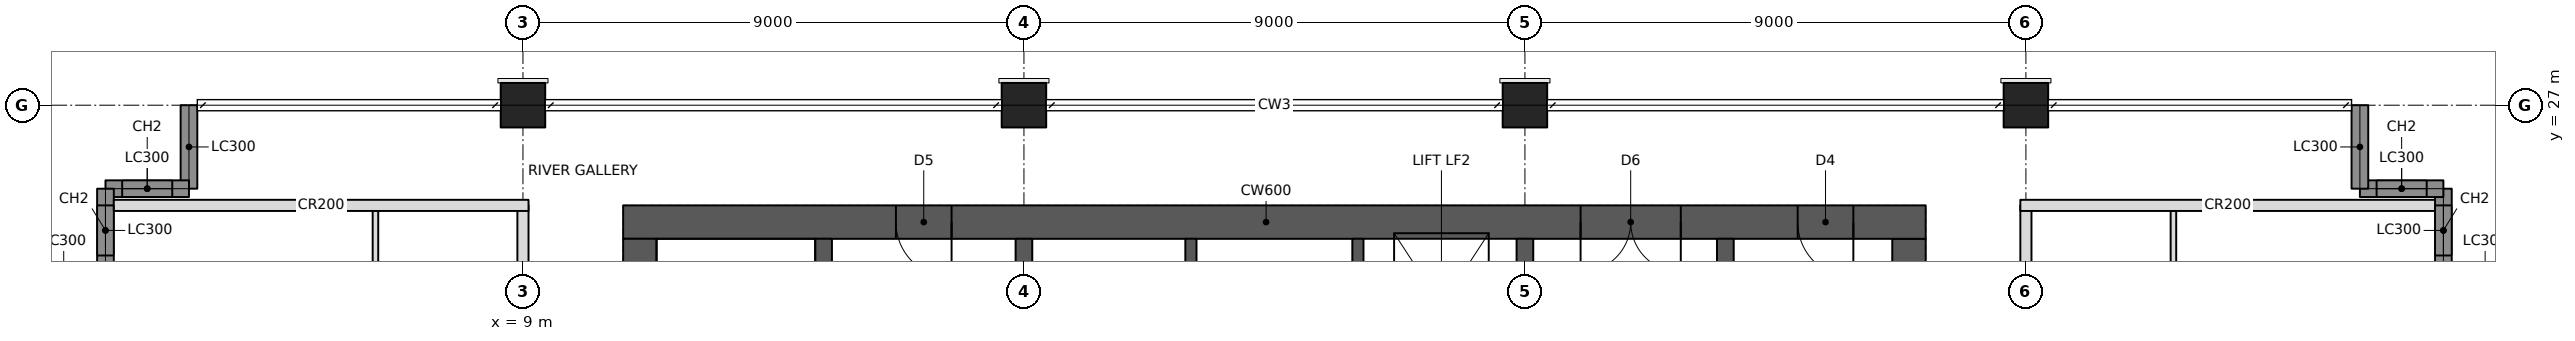
"""IFC4 building model, lengths in metres.
Left out: names, types, materials, properties, quantities, classifications, styles, units other than length and angle.
Written with IfcOpenShell. Run it as: python <this file> out.ifc"""

import sys

from ifc_helpers import new_model, si_unit, direction, frame, frame_2d, origin, origin_2d, place, context, subcontext, project, spatial, rectangle, hollow_rectangle, extrude, element, fill, save


model = new_model("IFC4")
c1 = context("Model", 3, precision=1e-05, world=origin(), true_north=direction((0.0, 1.0)))
c2 = subcontext(c1, "Body", "Model", "MODEL_VIEW")
j1 = project(units=[si_unit("LENGTHUNIT", "METRE"), si_unit("PLANEANGLEUNIT", "RADIAN")], contexts=[c1])
p1 = place(None, origin())
s1 = spatial("IfcSite", under=j1, at=p1, CompositionType="ELEMENT")
p2 = place(p1, origin())
s2 = spatial("IfcBuilding", under=s1, at=p2, CompositionType="ELEMENT")
p3 = place(p2, frame((0.0, 0.0, 177.4)))
s3 = spatial("IfcBuildingStorey", under=s2, at=p3, CompositionType="ELEMENT", Elevation=177.4)
for number, where, z_axis, x_axis in (
    (1, (9.0, 27.0, 0.0), (0.0, 0.0, 1.0), (1.0, 0.0, 0.0)),
    (2, (18.0, 27.0, 0.0), (0.0, 0.0, 1.0), (1.0, 0.0, 0.0)),
    (3, (27.0, 27.0, 0.0), (0.0, 0.0, 1.0), (1.0, 0.0, 0.0)),
    (4, (36.0, 27.0, 0.0), (0.0, 0.0, 1.0), (1.0, 0.0, 0.0)),
):
    element("IfcColumn", number, at=place(p3, frame(where, z_axis=z_axis, x_axis=x_axis)), inside=s3, PredefinedType="COLUMN", context=c2, shape_type="SweptSolid", body=[
        extrude(hollow_rectangle(XDim=0.8, YDim=0.8, WallThickness=0.07, at=origin_2d()), origin(), (0.0, 0.0, 1.0), 3.4),
    ])
p4 = place(p3, frame((10.8, 24.9, 0.0), z_axis=(0.0, 0.0, 1.0), x_axis=(1.0, 0.0, 0.0)))
e5 = element("IfcWall", 5, at=p4, inside=s3, PredefinedType="SHEAR", context=c2, shape_type="SweptSolid", body=[
    extrude(rectangle(XDim=23.4, YDim=0.6, at=frame_2d((11.7, 0.0))), origin(), (0.0, 0.0, 1.0), 3.4),
])
p5 = place(p4, frame((17.2, 0.0, 0.0)))
e6 = element("IfcOpeningElement", 6, at=p5, cuts=e5, PredefinedType="OPENING", context=c2, shape_type="SweptSolid", body=[
    extrude(rectangle(XDim=1.8, YDim=2.1, at=frame_2d((0.9, 1.05))), frame((0.0, 0.31, 0.0), z_axis=(0.0, -1.0, 0.0), x_axis=(1.0, 0.0, 0.0)), (0.0, 0.0, 1.0), 0.62),
])
p6 = place(p4, frame((21.1, 0.0, 0.0)))
e7 = element("IfcOpeningElement", 7, at=p6, cuts=e5, PredefinedType="OPENING", context=c2, shape_type="SweptSolid", body=[
    extrude(rectangle(XDim=1.0, YDim=2.1, at=frame_2d((0.5, 1.05))), frame((0.0, 0.31, 0.0), z_axis=(0.0, -1.0, 0.0), x_axis=(1.0, 0.0, 0.0)), (0.0, 0.0, 1.0), 0.62),
])
p7 = place(p4, frame((4.9, 0.0, 0.0)))
e8 = element("IfcOpeningElement", 8, at=p7, cuts=e5, PredefinedType="OPENING", context=c2, shape_type="SweptSolid", body=[
    extrude(rectangle(XDim=1.0, YDim=2.1, at=frame_2d((0.5, 1.05))), frame((0.0, 0.31, 0.0), z_axis=(0.0, -1.0, 0.0), x_axis=(1.0, 0.0, 0.0)), (0.0, 0.0, 1.0), 0.62),
])
for number, where, z_axis, x_axis in (
    (9, (11.1, 11.4, 0.0), (0.0, 0.0, 1.0), (0.0, 1.0, 0.0)),
    (10, (33.9, 11.4, 0.0), (0.0, 0.0, 1.0), (0.0, 1.0, 0.0)),
):
    element("IfcWall", number, at=place(p3, frame(where, z_axis=z_axis, x_axis=x_axis)), inside=s3, PredefinedType="SHEAR", context=c2, shape_type="SweptSolid", body=[
        extrude(rectangle(XDim=13.2, YDim=0.6, at=frame_2d((6.6, 0.0))), origin(), (0.0, 0.0, 1.0), 3.4),
    ])
p8 = place(p3, frame((14.4, 11.4, 0.0), z_axis=(0.0, 0.0, 1.0), x_axis=(0.0, 1.0, 0.0)))
e11 = element("IfcWall", 11, at=p8, inside=s3, PredefinedType="SHEAR", context=c2, shape_type="SweptSolid", body=[
    extrude(rectangle(XDim=13.2, YDim=0.3, at=frame_2d((6.6, 0.0))), origin(), (0.0, 0.0, 1.0), 3.4),
])
p9 = place(p3, frame((18.0, 11.4, 0.0), z_axis=(0.0, 0.0, 1.0), x_axis=(0.0, 1.0, 0.0)))
e12 = element("IfcWall", 12, at=p9, inside=s3, PredefinedType="SHEAR", context=c2, shape_type="SweptSolid", body=[
    extrude(rectangle(XDim=13.2, YDim=0.3, at=frame_2d((6.6, 0.0))), origin(), (0.0, 0.0, 1.0), 3.4),
])
p10 = place(p9, frame((3.6, 0.0, 0.0)))
e13 = element("IfcOpeningElement", 13, at=p10, cuts=e12, PredefinedType="OPENING", context=c2, shape_type="SweptSolid", body=[
    extrude(rectangle(XDim=1.0, YDim=2.1, at=frame_2d((0.5, 1.05))), frame((0.0, 0.16, 0.0), z_axis=(0.0, -1.0, 0.0), x_axis=(1.0, 0.0, 0.0)), (0.0, 0.0, 1.0), 0.32),
])
p11 = place(p9, frame((7.85, 0.0, 0.0)))
e14 = element("IfcOpeningElement", 14, at=p11, cuts=e12, PredefinedType="OPENING", context=c2, shape_type="SweptSolid", body=[
    extrude(rectangle(XDim=1.1, YDim=2.1, at=frame_2d((0.55, 1.05))), frame((0.0, 0.16, 0.0), z_axis=(0.0, -1.0, 0.0), x_axis=(1.0, 0.0, 0.0)), (0.0, 0.0, 1.0), 0.32),
])
p12 = place(p3, frame((27.0, 21.75, 0.0), z_axis=(0.0, 0.0, 1.0), x_axis=(0.0, 1.0, 0.0)))
e15 = element("IfcWall", 15, at=p12, inside=s3, PredefinedType="SHEAR", context=c2, shape_type="SweptSolid", body=[
    extrude(rectangle(XDim=2.85, YDim=0.3, at=frame_2d((1.425, 0.0))), origin(), (0.0, 0.0, 1.0), 3.4),
])
for number, where, z_axis, x_axis in (
    (16, (21.0, 21.75, 0.0), (0.0, 0.0, 1.0), (0.0, 1.0, 0.0)),
    (17, (24.0, 21.75, 0.0), (0.0, 0.0, 1.0), (0.0, 1.0, 0.0)),
):
    element("IfcWall", number, at=place(p3, frame(where, z_axis=z_axis, x_axis=x_axis)), inside=s3, PredefinedType="SHEAR", context=c2, shape_type="SweptSolid", body=[
        extrude(rectangle(XDim=2.85, YDim=0.2, at=frame_2d((1.425, 0.0))), origin(), (0.0, 0.0, 1.0), 3.4),
    ])
p13 = place(p3, frame((30.6, 11.4, 0.0), z_axis=(0.0, 0.0, 1.0), x_axis=(0.0, 1.0, 0.0)))
e18 = element("IfcWall", 18, at=p13, inside=s3, PredefinedType="SHEAR", context=c2, shape_type="SweptSolid", body=[
    extrude(rectangle(XDim=13.2, YDim=0.3, at=frame_2d((6.6, 0.0))), origin(), (0.0, 0.0, 1.0), 3.4),
])
p14 = place(p3, frame((43.5, 24.0, 0.0), z_axis=(0.0, 0.0, 1.0), x_axis=(0.0, 1.0, 0.0)))
e19 = element("IfcWall", 19, at=p14, inside=s3, PredefinedType="SOLIDWALL", context=c2, shape_type="SweptSolid", body=[
    extrude(rectangle(XDim=1.5, YDim=0.3, at=frame_2d((0.75, 0.0))), origin(), (0.0, 0.0, 1.0), 3.2),
])
p15 = place(p14, frame((0.3, 0.0, 0.6)))
e20 = element("IfcOpeningElement", 20, at=p15, cuts=e19, PredefinedType="OPENING", context=c2, shape_type="SweptSolid", body=[
    extrude(rectangle(XDim=0.9, YDim=2.2, at=frame_2d((0.45, 1.1))), frame((0.0, 0.16, 0.0), z_axis=(0.0, -1.0, 0.0), x_axis=(1.0, 0.0, 0.0)), (0.0, 0.0, 1.0), 0.32),
])
p16 = place(p3, frame((43.5, 25.5, 0.0), z_axis=(0.0, 0.0, 1.0), x_axis=(-1.0, 0.0, 0.0)))
e21 = element("IfcWall", 21, at=p16, inside=s3, PredefinedType="SOLIDWALL", context=c2, shape_type="SweptSolid", body=[
    extrude(rectangle(XDim=1.5, YDim=0.3, at=frame_2d((0.75, 0.0))), origin(), (0.0, 0.0, 1.0), 3.2),
])
p17 = place(p16, frame((0.3, 0.0, 0.6)))
e22 = element("IfcOpeningElement", 22, at=p17, cuts=e21, PredefinedType="OPENING", context=c2, shape_type="SweptSolid", body=[
    extrude(rectangle(XDim=0.9, YDim=2.2, at=frame_2d((0.45, 1.1))), frame((0.0, 0.16, 0.0), z_axis=(0.0, -1.0, 0.0), x_axis=(1.0, 0.0, 0.0)), (0.0, 0.0, 1.0), 0.32),
])
for number, where, z_axis, x_axis in (
    (23, (42.0, 25.5, 0.0), (0.0, 0.0, 1.0), (0.0, 1.0, 0.0)),
    (24, (3.0, 27.0, 0.0), (0.0, 0.0, 1.0), (0.0, -1.0, 0.0)),
):
    element("IfcWall", number, at=place(p3, frame(where, z_axis=z_axis, x_axis=x_axis)), inside=s3, PredefinedType="SOLIDWALL", context=c2, shape_type="SweptSolid", body=[
        extrude(rectangle(XDim=1.5, YDim=0.3, at=frame_2d((0.75, 0.0))), origin(), (0.0, 0.0, 1.0), 2.42),
    ])
p18 = place(p3, frame((3.0, 25.5, 0.0), z_axis=(0.0, 0.0, 1.0), x_axis=(-1.0, 0.0, 0.0)))
e25 = element("IfcWall", 25, at=p18, inside=s3, PredefinedType="SOLIDWALL", context=c2, shape_type="SweptSolid", body=[
    extrude(rectangle(XDim=1.5, YDim=0.3, at=frame_2d((0.75, 0.0))), origin(), (0.0, 0.0, 1.0), 3.2),
])
p19 = place(p18, frame((0.3, 0.0, 0.6)))
e26 = element("IfcOpeningElement", 26, at=p19, cuts=e25, PredefinedType="OPENING", context=c2, shape_type="SweptSolid", body=[
    extrude(rectangle(XDim=0.9, YDim=2.2, at=frame_2d((0.45, 1.1))), frame((0.0, 0.16, 0.0), z_axis=(0.0, -1.0, 0.0), x_axis=(1.0, 0.0, 0.0)), (0.0, 0.0, 1.0), 0.32),
])
p20 = place(p3, frame((1.5, 25.5, 0.0), z_axis=(0.0, 0.0, 1.0), x_axis=(0.0, -1.0, 0.0)))
e27 = element("IfcWall", 27, at=p20, inside=s3, PredefinedType="SOLIDWALL", context=c2, shape_type="SweptSolid", body=[
    extrude(rectangle(XDim=1.5, YDim=0.3, at=frame_2d((0.75, 0.0))), origin(), (0.0, 0.0, 1.0), 3.2),
])
p21 = place(p20, frame((0.3, 0.0, 0.6)))
e28 = element("IfcOpeningElement", 28, at=p21, cuts=e27, PredefinedType="OPENING", context=c2, shape_type="SweptSolid", body=[
    extrude(rectangle(XDim=0.9, YDim=2.2, at=frame_2d((0.45, 1.1))), frame((0.0, 0.16, 0.0), z_axis=(0.0, -1.0, 0.0), x_axis=(1.0, 0.0, 0.0)), (0.0, 0.0, 1.0), 0.32),
])
p22 = place(p3, frame((9.0, 18.4, 0.0), z_axis=(0.0, 0.0, 1.0), x_axis=(0.0, 1.0, 0.0)))
e29 = element("IfcWall", 29, at=p22, inside=s3, PredefinedType="PARTITIONING", context=c2, shape_type="SweptSolid", body=[
    extrude(rectangle(XDim=6.8, YDim=0.2, at=frame_2d((3.4, 0.0))), origin(), (0.0, 0.0, 1.0), 2.405),
])
p23 = place(p3, frame((1.65, 25.2, 0.0), z_axis=(0.0, 0.0, 1.0), x_axis=(1.0, 0.0, 0.0)))
e30 = element("IfcWall", 30, at=p23, inside=s3, PredefinedType="PARTITIONING", context=c2, shape_type="SweptSolid", body=[
    extrude(rectangle(XDim=7.45, YDim=0.2, at=frame_2d((3.725, 0.0))), origin(), (0.0, 0.0, 1.0), 2.404),
])
p24 = place(p3, frame((36.0, 18.4, 0.0), z_axis=(0.0, 0.0, 1.0), x_axis=(0.0, 1.0, 0.0)))
e31 = element("IfcWall", 31, at=p24, inside=s3, PredefinedType="PARTITIONING", context=c2, shape_type="SweptSolid", body=[
    extrude(rectangle(XDim=6.8, YDim=0.2, at=frame_2d((3.4, 0.0))), origin(), (0.0, 0.0, 1.0), 2.405),
])
p25 = place(p3, frame((35.9, 25.2, 0.0), z_axis=(0.0, 0.0, 1.0), x_axis=(1.0, 0.0, 0.0)))
e32 = element("IfcWall", 32, at=p25, inside=s3, PredefinedType="PARTITIONING", context=c2, shape_type="SweptSolid", body=[
    extrude(rectangle(XDim=7.45, YDim=0.2, at=frame_2d((3.725, 0.0))), origin(), (0.0, 0.0, 1.0), 2.404),
])
for number, where, z_axis, x_axis in (
    (33, (6.35, 21.65, 0.0), (0.0, 0.0, 1.0), (0.0, 1.0, 0.0)),
    (34, (38.65, 21.65, 0.0), (0.0, 0.0, 1.0), (0.0, 1.0, 0.0)),
):
    element("IfcWall", number, at=place(p3, frame(where, z_axis=z_axis, x_axis=x_axis)), inside=s3, PredefinedType="PARTITIONING", context=c2, shape_type="SweptSolid", body=[
        extrude(rectangle(XDim=3.45, YDim=0.1, at=frame_2d((1.725, 0.0))), origin(), (0.0, 0.0, 1.0), 3.2),
    ])
p26 = place(p15, origin())
e35 = element("IfcWindow", 35, at=p26, inside=s3, PartitioningType="SINGLE_PANEL", PredefinedType="WINDOW", context=c2, shape_type="SweptSolid", body=[
    extrude(rectangle(XDim=0.9, YDim=2.2, at=frame_2d((0.45, 1.1))), frame((0.0, 0.03, 0.0), z_axis=(0.0, -1.0, 0.0), x_axis=(1.0, 0.0, 0.0)), (0.0, 0.0, 1.0), 0.06),
])
fill(e20, e35)
p27 = place(p17, origin())
e36 = element("IfcWindow", 36, at=p27, inside=s3, PartitioningType="SINGLE_PANEL", PredefinedType="WINDOW", context=c2, shape_type="SweptSolid", body=[
    extrude(rectangle(XDim=0.9, YDim=2.2, at=frame_2d((0.45, 1.1))), frame((0.0, 0.03, 0.0), z_axis=(0.0, -1.0, 0.0), x_axis=(1.0, 0.0, 0.0)), (0.0, 0.0, 1.0), 0.06),
])
fill(e22, e36)
p28 = place(p19, origin())
e37 = element("IfcWindow", 37, at=p28, inside=s3, PartitioningType="SINGLE_PANEL", PredefinedType="WINDOW", context=c2, shape_type="SweptSolid", body=[
    extrude(rectangle(XDim=0.9, YDim=2.2, at=frame_2d((0.45, 1.1))), frame((0.0, 0.03, 0.0), z_axis=(0.0, -1.0, 0.0), x_axis=(1.0, 0.0, 0.0)), (0.0, 0.0, 1.0), 0.06),
])
fill(e26, e37)
p29 = place(p21, origin())
e38 = element("IfcWindow", 38, at=p29, inside=s3, PartitioningType="SINGLE_PANEL", PredefinedType="WINDOW", context=c2, shape_type="SweptSolid", body=[
    extrude(rectangle(XDim=0.9, YDim=2.2, at=frame_2d((0.45, 1.1))), frame((0.0, 0.03, 0.0), z_axis=(0.0, -1.0, 0.0), x_axis=(1.0, 0.0, 0.0)), (0.0, 0.0, 1.0), 0.06),
])
fill(e28, e38)
p30 = place(p5, frame((1.8, 0.0, 0.0), z_axis=(0.0, 0.0, 1.0), x_axis=(-1.0, 0.0, 0.0)))
e39 = element("IfcDoor", 39, at=p30, inside=s3, OperationType="DOUBLE_DOOR_SINGLE_SWING", PredefinedType="DOOR", context=c2, shape_type="SweptSolid", body=[
    extrude(rectangle(XDim=1.8, YDim=2.1, at=frame_2d((0.9, 1.05))), frame((0.0, 0.025, 0.0), z_axis=(0.0, -1.0, 0.0), x_axis=(1.0, 0.0, 0.0)), (0.0, 0.0, 1.0), 0.05),
])
fill(e6, e39)
p31 = place(p6, frame((1.0, 0.0, 0.0), z_axis=(0.0, 0.0, 1.0), x_axis=(-1.0, 0.0, 0.0)))
e40 = element("IfcDoor", 40, at=p31, inside=s3, OperationType="SINGLE_SWING_LEFT", PredefinedType="DOOR", context=c2, shape_type="SweptSolid", body=[
    extrude(rectangle(XDim=1.0, YDim=2.1, at=frame_2d((0.5, 1.05))), frame((0.0, 0.025, 0.0), z_axis=(0.0, -1.0, 0.0), x_axis=(1.0, 0.0, 0.0)), (0.0, 0.0, 1.0), 0.05),
])
fill(e7, e40)
p32 = place(p7, frame((1.0, 0.0, 0.0), z_axis=(0.0, 0.0, 1.0), x_axis=(-1.0, 0.0, 0.0)))
e41 = element("IfcDoor", 41, at=p32, inside=s3, OperationType="SINGLE_SWING_LEFT", PredefinedType="DOOR", context=c2, shape_type="SweptSolid", body=[
    extrude(rectangle(XDim=1.0, YDim=2.1, at=frame_2d((0.5, 1.05))), frame((0.0, 0.025, 0.0), z_axis=(0.0, -1.0, 0.0), x_axis=(1.0, 0.0, 0.0)), (0.0, 0.0, 1.0), 0.05),
])
fill(e8, e41)
save(model, sys.argv[1])
